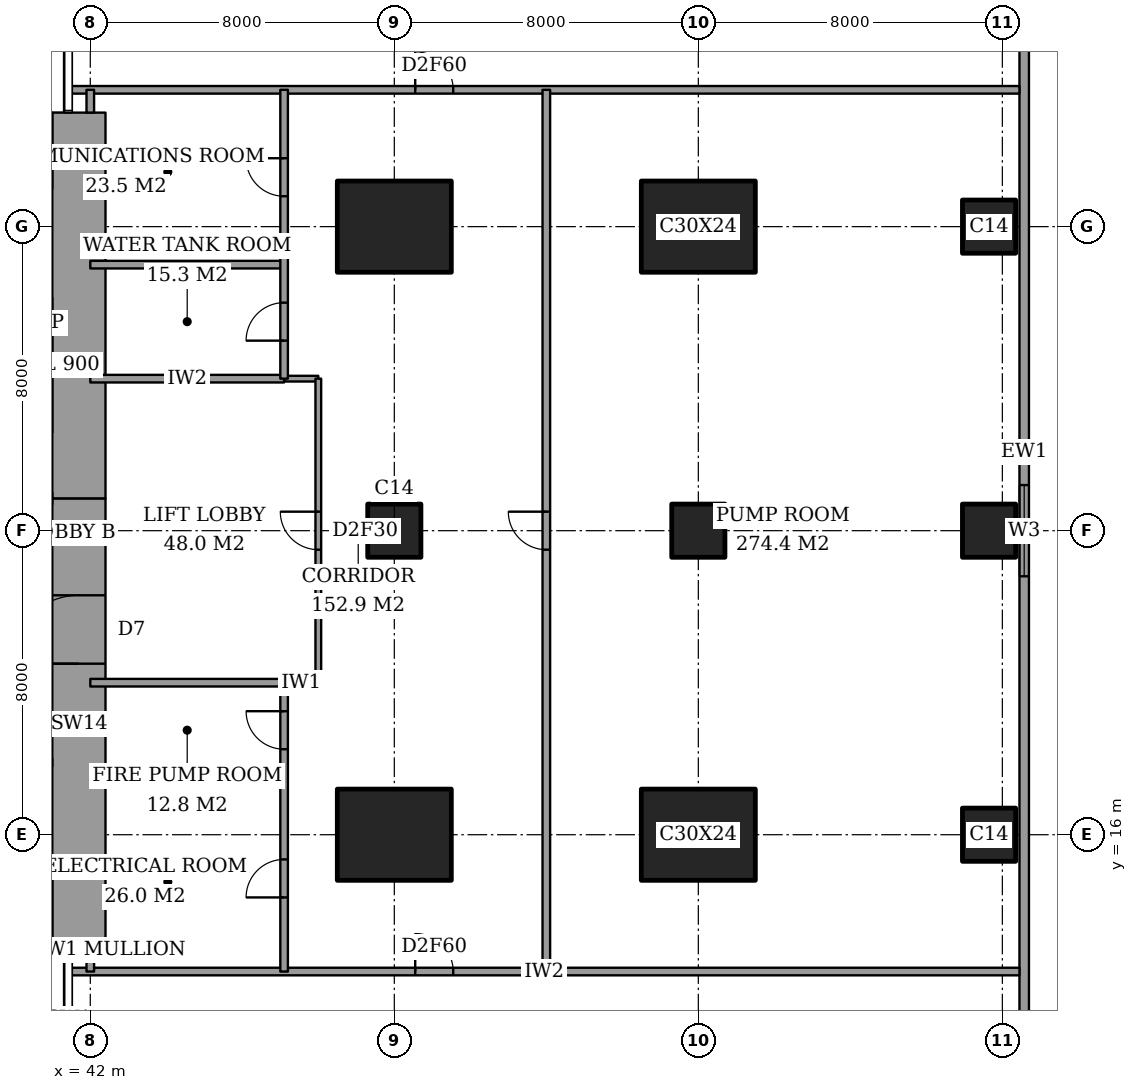
"""IFC4 building model, lengths in metres.
Left out: names, types, materials, properties, quantities, classifications, styles, units other than length and angle.
Written with IfcOpenShell. Run it as: python <this file> out.ifc"""

import sys

from ifc_helpers import new_model, si_unit, direction, frame, frame_2d, origin, origin_2d, place, context, subcontext, project, spatial, rectangle, extrude, element, fill, save


model = new_model("IFC4")
c1 = context("Model", 3, precision=1e-05, world=origin(), true_north=direction((0.0, 1.0)))
c2 = subcontext(c1, "Body", "Model", "MODEL_VIEW")
j1 = project(units=[si_unit("LENGTHUNIT", "METRE"), si_unit("PLANEANGLEUNIT", "RADIAN")], contexts=[c1])
p1 = place(None, origin())
s1 = spatial("IfcSite", under=j1, at=p1, CompositionType="ELEMENT")
p2 = place(p1, origin())
s2 = spatial("IfcBuilding", under=s1, at=p2, CompositionType="ELEMENT")
p3 = place(p2, frame((0.0, 0.0, 291.6)))
s3 = spatial("IfcBuildingStorey", under=s2, at=p3, CompositionType="ELEMENT", Elevation=291.6)
p4 = place(p3, frame((50.0, 16.0, 0.0), z_axis=(0.0, 0.0, 1.0), x_axis=(1.0, 0.0, 0.0)))
e1 = element("IfcColumn", 1, at=p4, inside=s3, PredefinedType="COLUMN", context=c2, shape_type="SweptSolid", body=[
    extrude(rectangle(XDim=3.0, YDim=2.4, at=origin_2d()), origin(), (0.0, 0.0, 1.0), 5.0),
])
p5 = place(p3, frame((50.0, 24.0, 0.0), z_axis=(0.0, 0.0, 1.0), x_axis=(1.0, 0.0, 0.0)))
e2 = element("IfcColumn", 2, at=p5, inside=s3, PredefinedType="COLUMN", context=c2, shape_type="SweptSolid", body=[
    extrude(rectangle(XDim=1.4, YDim=1.4, at=origin_2d()), origin(), (0.0, 0.0, 1.0), 5.0),
])
for number, where, z_axis, x_axis in (
    (3, (50.0, 32.0, 0.0), (0.0, 0.0, 1.0), (1.0, 0.0, 0.0)),
    (4, (58.0, 16.0, 0.0), (0.0, 0.0, 1.0), (1.0, 0.0, 0.0)),
):
    element("IfcColumn", number, at=place(p3, frame(where, z_axis=z_axis, x_axis=x_axis)), inside=s3, PredefinedType="COLUMN", context=c2, shape_type="SweptSolid", body=[
        extrude(rectangle(XDim=3.0, YDim=2.4, at=origin_2d()), origin(), (0.0, 0.0, 1.0), 5.0),
    ])
p6 = place(p3, frame((58.0, 24.0, 0.0), z_axis=(0.0, 0.0, 1.0), x_axis=(1.0, 0.0, 0.0)))
e5 = element("IfcColumn", 5, at=p6, inside=s3, PredefinedType="COLUMN", context=c2, shape_type="SweptSolid", body=[
    extrude(rectangle(XDim=1.4, YDim=1.4, at=origin_2d()), origin(), (0.0, 0.0, 1.0), 5.0),
])
p7 = place(p3, frame((58.0, 32.0, 0.0), z_axis=(0.0, 0.0, 1.0), x_axis=(1.0, 0.0, 0.0)))
e6 = element("IfcColumn", 6, at=p7, inside=s3, PredefinedType="COLUMN", context=c2, shape_type="SweptSolid", body=[
    extrude(rectangle(XDim=3.0, YDim=2.4, at=origin_2d()), origin(), (0.0, 0.0, 1.0), 5.0),
])
for number, where, z_axis, x_axis in (
    (7, (65.65, 16.0, 0.0), (0.0, 0.0, 1.0), (1.0, 0.0, 0.0)),
    (8, (65.65, 24.0, 0.0), (0.0, 0.0, 1.0), (1.0, 0.0, 0.0)),
    (9, (65.65, 32.0, 0.0), (0.0, 0.0, 1.0), (1.0, 0.0, 0.0)),
):
    element("IfcColumn", number, at=place(p3, frame(where, z_axis=z_axis, x_axis=x_axis)), inside=s3, PredefinedType="COLUMN", context=c2, shape_type="SweptSolid", body=[
        extrude(rectangle(XDim=1.4, YDim=1.4, at=origin_2d()), origin(), (0.0, 0.0, 1.0), 5.0),
    ])
p8 = place(p3, frame((41.7, 13.0, 0.0), z_axis=(0.0, 0.0, 1.0), x_axis=(0.0, 1.0, 0.0)))
e10 = element("IfcWall", 10, at=p8, inside=s3, PredefinedType="SHEAR", context=c2, shape_type="SweptSolid", body=[
    extrude(rectangle(XDim=11.85, YDim=1.4, at=frame_2d((5.925, 0.0))), origin(), (0.0, 0.0, 1.0), 5.0),
])
p9 = place(p8, frame((7.5, 0.0, 0.0)))
e11 = element("IfcOpeningElement", 11, at=p9, cuts=e10, PredefinedType="OPENING", context=c2, shape_type="SweptSolid", body=[
    extrude(rectangle(XDim=1.8, YDim=2.4, at=frame_2d((0.9, 1.2))), frame((0.0, 0.71, 0.0), z_axis=(0.0, -1.0, 0.0), x_axis=(1.0, 0.0, 0.0)), (0.0, 0.0, 1.0), 1.42),
])
p10 = place(p3, frame((41.7, 24.85, 0.0), z_axis=(0.0, 0.0, 1.0), x_axis=(0.0, 1.0, 0.0)))
e12 = element("IfcWall", 12, at=p10, inside=s3, PredefinedType="SHEAR", context=c2, shape_type="SweptSolid", body=[
    extrude(rectangle(XDim=10.15, YDim=1.4, at=frame_2d((5.075, 0.0))), origin(), (0.0, 0.0, 1.0), 5.0),
])
p11 = place(p3, frame((66.575, 3.175, 0.0), z_axis=(0.0, 0.0, 1.0), x_axis=(0.0, 1.0, 0.0)))
e13 = element("IfcWall", 13, at=p11, inside=s3, PredefinedType="SOLIDWALL", context=c2, shape_type="SweptSolid", body=[
    extrude(rectangle(XDim=41.65, YDim=0.25, at=frame_2d((20.825, 0.0))), origin(), (0.0, 0.0, 1.0), 5.0),
])
p12 = place(p11, frame((1.35, 0.0, 0.6)))
e14 = element("IfcOpeningElement", 14, at=p12, cuts=e13, PredefinedType="OPENING", context=c2, shape_type="SweptSolid", body=[
    extrude(rectangle(XDim=2.4, YDim=3.0, at=frame_2d((1.2, 1.5))), frame((0.0, 0.135, 0.0), z_axis=(0.0, -1.0, 0.0), x_axis=(1.0, 0.0, 0.0)), (0.0, 0.0, 1.0), 0.27),
])
p13 = place(p11, frame((19.625, 0.0, 0.6)))
e15 = element("IfcOpeningElement", 15, at=p13, cuts=e13, PredefinedType="OPENING", context=c2, shape_type="SweptSolid", body=[
    extrude(rectangle(XDim=2.4, YDim=3.0, at=frame_2d((1.2, 1.5))), frame((0.0, 0.135, 0.0), z_axis=(0.0, -1.0, 0.0), x_axis=(1.0, 0.0, 0.0)), (0.0, 0.0, 1.0), 0.27),
])
p14 = place(p11, frame((37.9, 0.0, 0.6)))
e16 = element("IfcOpeningElement", 16, at=p14, cuts=e13, PredefinedType="OPENING", context=c2, shape_type="SweptSolid", body=[
    extrude(rectangle(XDim=2.4, YDim=3.0, at=frame_2d((1.2, 1.5))), frame((0.0, 0.135, 0.0), z_axis=(0.0, -1.0, 0.0), x_axis=(1.0, 0.0, 0.0)), (0.0, 0.0, 1.0), 0.27),
])
p15 = place(p3, frame((41.439, 12.4, 0.0), z_axis=(0.0, 0.0, 1.0), x_axis=(1.0, 0.0, 0.0)))
e17 = element("IfcWall", 17, at=p15, inside=s3, PredefinedType="PARTITIONING", context=c2, shape_type="SweptSolid", body=[
    extrude(rectangle(XDim=25.011, YDim=0.2, at=frame_2d((12.505, 0.0))), origin(), (0.0, 0.0, 1.0), 4.7),
])
p16 = place(p15, frame((9.111, 0.0, 0.0)))
e18 = element("IfcOpeningElement", 18, at=p16, cuts=e17, PredefinedType="OPENING", context=c2, shape_type="SweptSolid", body=[
    extrude(rectangle(XDim=1.0, YDim=2.1, at=frame_2d((0.5, 1.05))), frame((0.0, 0.11, 0.0), z_axis=(0.0, -1.0, 0.0), x_axis=(1.0, 0.0, 0.0)), (0.0, 0.0, 1.0), 0.22),
])
for number, where, z_axis, x_axis in (
    (19, (42.0, 17.5, 0.0), (0.0, 0.0, 1.0), (1.0, 0.0, 0.0)),
    (20, (42.0, 20.0, 0.0), (0.0, 0.0, 1.0), (1.0, 0.0, 0.0)),
):
    element("IfcWall", number, at=place(p3, frame(where, z_axis=z_axis, x_axis=x_axis)), inside=s3, PredefinedType="PARTITIONING", context=c2, shape_type="SweptSolid", body=[
        extrude(rectangle(XDim=5.1, YDim=0.2, at=frame_2d((2.55, 0.0))), origin(), (0.0, 0.0, 1.0), 4.7),
    ])
p17 = place(p3, frame((47.1, 20.0, 0.0), z_axis=(0.0, 0.0, 1.0), x_axis=(1.0, 0.0, 0.0)))
e21 = element("IfcWall", 21, at=p17, inside=s3, PredefinedType="PARTITIONING", context=c2, shape_type="SweptSolid", body=[
    extrude(rectangle(XDim=0.9, YDim=0.15, at=frame_2d((0.45, 0.0))), origin(), (0.0, 0.0, 1.0), 4.7),
])
p18 = place(p3, frame((42.0, 28.0, 0.0), z_axis=(0.0, 0.0, 1.0), x_axis=(1.0, 0.0, 0.0)))
e22 = element("IfcWall", 22, at=p18, inside=s3, PredefinedType="PARTITIONING", context=c2, shape_type="SweptSolid", body=[
    extrude(rectangle(XDim=5.1, YDim=0.2, at=frame_2d((2.55, 0.0))), origin(), (0.0, 0.0, 1.0), 4.7),
])
p19 = place(p3, frame((47.1, 28.0, 0.0), z_axis=(0.0, 0.0, 1.0), x_axis=(1.0, 0.0, 0.0)))
e23 = element("IfcWall", 23, at=p19, inside=s3, PredefinedType="PARTITIONING", context=c2, shape_type="SweptSolid", body=[
    extrude(rectangle(XDim=0.9, YDim=0.15, at=frame_2d((0.45, 0.0))), origin(), (0.0, 0.0, 1.0), 4.7),
])
p20 = place(p3, frame((42.0, 31.0, 0.0), z_axis=(0.0, 0.0, 1.0), x_axis=(1.0, 0.0, 0.0)))
e24 = element("IfcWall", 24, at=p20, inside=s3, PredefinedType="PARTITIONING", context=c2, shape_type="SweptSolid", body=[
    extrude(rectangle(XDim=5.1, YDim=0.2, at=frame_2d((2.55, 0.0))), origin(), (0.0, 0.0, 1.0), 4.7),
])
p21 = place(p3, frame((41.439, 35.6, 0.0), z_axis=(0.0, 0.0, 1.0), x_axis=(1.0, 0.0, 0.0)))
e25 = element("IfcWall", 25, at=p21, inside=s3, PredefinedType="PARTITIONING", context=c2, shape_type="SweptSolid", body=[
    extrude(rectangle(XDim=25.011, YDim=0.2, at=frame_2d((12.505, 0.0))), origin(), (0.0, 0.0, 1.0), 4.7),
])
p22 = place(p21, frame((9.111, 0.0, 0.0)))
e26 = element("IfcOpeningElement", 26, at=p22, cuts=e25, PredefinedType="OPENING", context=c2, shape_type="SweptSolid", body=[
    extrude(rectangle(XDim=1.0, YDim=2.1, at=frame_2d((0.5, 1.05))), frame((0.0, 0.11, 0.0), z_axis=(0.0, -1.0, 0.0), x_axis=(1.0, 0.0, 0.0)), (0.0, 0.0, 1.0), 0.22),
])
for number, where, z_axis, x_axis in (
    (27, (42.0, 12.4, 0.0), (0.0, 0.0, 1.0), (0.0, 1.0, 0.0)),
    (28, (42.0, 35.0, 0.0), (0.0, 0.0, 1.0), (0.0, 1.0, 0.0)),
):
    element("IfcWall", number, at=place(p3, frame(where, z_axis=z_axis, x_axis=x_axis)), inside=s3, PredefinedType="PARTITIONING", context=c2, shape_type="SweptSolid", body=[
        extrude(rectangle(XDim=0.6, YDim=0.2, at=frame_2d((0.3, 0.0))), origin(), (0.0, 0.0, 1.0), 4.7),
    ])
p23 = place(p3, frame((47.1, 12.4, 0.0), z_axis=(0.0, 0.0, 1.0), x_axis=(0.0, 1.0, 0.0)))
e29 = element("IfcWall", 29, at=p23, inside=s3, PredefinedType="PARTITIONING", context=c2, shape_type="SweptSolid", body=[
    extrude(rectangle(XDim=7.6, YDim=0.2, at=frame_2d((3.8, 0.0))), origin(), (0.0, 0.0, 1.0), 4.7),
])
p24 = place(p23, frame((1.95, 0.0, 0.0)))
e30 = element("IfcOpeningElement", 30, at=p24, cuts=e29, PredefinedType="OPENING", context=c2, shape_type="SweptSolid", body=[
    extrude(rectangle(XDim=1.0, YDim=2.1, at=frame_2d((0.5, 1.05))), frame((0.0, 0.11, 0.0), z_axis=(0.0, -1.0, 0.0), x_axis=(1.0, 0.0, 0.0)), (0.0, 0.0, 1.0), 0.22),
])
p25 = place(p23, frame((5.85, 0.0, 0.0)))
e31 = element("IfcOpeningElement", 31, at=p25, cuts=e29, PredefinedType="OPENING", context=c2, shape_type="SweptSolid", body=[
    extrude(rectangle(XDim=1.0, YDim=2.1, at=frame_2d((0.5, 1.05))), frame((0.0, 0.11, 0.0), z_axis=(0.0, -1.0, 0.0), x_axis=(1.0, 0.0, 0.0)), (0.0, 0.0, 1.0), 0.22),
])
p26 = place(p3, frame((47.1, 28.0, 0.0), z_axis=(0.0, 0.0, 1.0), x_axis=(0.0, 1.0, 0.0)))
e32 = element("IfcWall", 32, at=p26, inside=s3, PredefinedType="PARTITIONING", context=c2, shape_type="SweptSolid", body=[
    extrude(rectangle(XDim=7.6, YDim=0.2, at=frame_2d((3.8, 0.0))), origin(), (0.0, 0.0, 1.0), 4.7),
])
p27 = place(p26, frame((1.0, 0.0, 0.0)))
e33 = element("IfcOpeningElement", 33, at=p27, cuts=e32, PredefinedType="OPENING", context=c2, shape_type="SweptSolid", body=[
    extrude(rectangle(XDim=1.0, YDim=2.1, at=frame_2d((0.5, 1.05))), frame((0.0, 0.11, 0.0), z_axis=(0.0, -1.0, 0.0), x_axis=(1.0, 0.0, 0.0)), (0.0, 0.0, 1.0), 0.22),
])
p28 = place(p26, frame((4.8, 0.0, 0.0)))
e34 = element("IfcOpeningElement", 34, at=p28, cuts=e32, PredefinedType="OPENING", context=c2, shape_type="SweptSolid", body=[
    extrude(rectangle(XDim=1.0, YDim=2.1, at=frame_2d((0.5, 1.05))), frame((0.0, 0.11, 0.0), z_axis=(0.0, -1.0, 0.0), x_axis=(1.0, 0.0, 0.0)), (0.0, 0.0, 1.0), 0.22),
])
p29 = place(p3, frame((48.0, 20.0, 0.0), z_axis=(0.0, 0.0, 1.0), x_axis=(0.0, 1.0, 0.0)))
e35 = element("IfcWall", 35, at=p29, inside=s3, PredefinedType="PARTITIONING", context=c2, shape_type="SweptSolid", body=[
    extrude(rectangle(XDim=8.0, YDim=0.15, at=frame_2d((4.0, 0.0))), origin(), (0.0, 0.0, 1.0), 4.7),
])
p30 = place(p29, frame((3.5, 0.0, 0.0)))
e36 = element("IfcOpeningElement", 36, at=p30, cuts=e35, PredefinedType="OPENING", context=c2, shape_type="SweptSolid", body=[
    extrude(rectangle(XDim=1.0, YDim=2.1, at=frame_2d((0.5, 1.05))), frame((0.0, 0.085, 0.0), z_axis=(0.0, -1.0, 0.0), x_axis=(1.0, 0.0, 0.0)), (0.0, 0.0, 1.0), 0.17),
])
p31 = place(p3, frame((54.0, 12.4, 0.0), z_axis=(0.0, 0.0, 1.0), x_axis=(0.0, 1.0, 0.0)))
e37 = element("IfcWall", 37, at=p31, inside=s3, PredefinedType="PARTITIONING", context=c2, shape_type="SweptSolid", body=[
    extrude(rectangle(XDim=23.2, YDim=0.2, at=frame_2d((11.6, 0.0))), origin(), (0.0, 0.0, 1.0), 4.7),
])
p32 = place(p31, frame((11.1, 0.0, 0.0)))
e38 = element("IfcOpeningElement", 38, at=p32, cuts=e37, PredefinedType="OPENING", context=c2, shape_type="SweptSolid", body=[
    extrude(rectangle(XDim=1.0, YDim=2.1, at=frame_2d((0.5, 1.05))), frame((0.0, 0.11, 0.0), z_axis=(0.0, -1.0, 0.0), x_axis=(1.0, 0.0, 0.0)), (0.0, 0.0, 1.0), 0.22),
])
p33 = place(p3, frame((28.3, 17.9, 0.0), z_axis=(0.0, 0.0, 1.0), x_axis=(1.0, 0.0, 0.0)))
e39 = element("IfcWall", 39, at=p33, inside=s3, PredefinedType="PARTITIONING", context=c2, shape_type="SweptSolid", body=[
    extrude(rectangle(XDim=12.7, YDim=0.2, at=frame_2d((6.35, 0.0))), origin(), (0.0, 0.0, 1.0), 5.0),
])
p34 = place(p33, frame((1.0, 0.0, 0.0)))
e40 = element("IfcOpeningElement", 40, at=p34, cuts=e39, PredefinedType="OPENING", context=c2, shape_type="SweptSolid", body=[
    extrude(rectangle(XDim=1.0, YDim=2.1, at=frame_2d((0.5, 1.05))), frame((0.0, 0.11, 0.0), z_axis=(0.0, -1.0, 0.0), x_axis=(1.0, 0.0, 0.0)), (0.0, 0.0, 1.0), 0.22),
])
p35 = place(p33, frame((10.6, 0.0, 0.0)))
e41 = element("IfcOpeningElement", 41, at=p35, cuts=e39, PredefinedType="OPENING", context=c2, shape_type="SweptSolid", body=[
    extrude(rectangle(XDim=1.2, YDim=2.1, at=frame_2d((0.6, 1.05))), frame((0.0, 0.11, 0.0), z_axis=(0.0, -1.0, 0.0), x_axis=(1.0, 0.0, 0.0)), (0.0, 0.0, 1.0), 0.22),
])
p36 = place(p13, origin())
e42 = element("IfcWindow", 42, at=p36, inside=s3, PartitioningType="SINGLE_PANEL", PredefinedType="WINDOW", context=c2, shape_type="SweptSolid", body=[
    extrude(rectangle(XDim=2.4, YDim=3.0, at=frame_2d((1.2, 1.5))), frame((0.0, 0.03, 0.0), z_axis=(0.0, -1.0, 0.0), x_axis=(1.0, 0.0, 0.0)), (0.0, 0.0, 1.0), 0.06),
])
fill(e15, e42)
p37 = place(p16, origin())
e43 = element("IfcDoor", 43, at=p37, inside=s3, OperationType="SINGLE_SWING_RIGHT", PredefinedType="DOOR", context=c2, shape_type="SweptSolid", body=[
    extrude(rectangle(XDim=1.0, YDim=2.1, at=frame_2d((0.5, 1.05))), frame((0.0, 0.025, 0.0), z_axis=(0.0, -1.0, 0.0), x_axis=(1.0, 0.0, 0.0)), (0.0, 0.0, 1.0), 0.05),
])
fill(e18, e43)
p38 = place(p32, origin())
e44 = element("IfcDoor", 44, at=p38, inside=s3, OperationType="SINGLE_SWING_LEFT", PredefinedType="DOOR", context=c2, shape_type="SweptSolid", body=[
    extrude(rectangle(XDim=1.0, YDim=2.1, at=frame_2d((0.5, 1.05))), frame((0.0, 0.025, 0.0), z_axis=(0.0, -1.0, 0.0), x_axis=(1.0, 0.0, 0.0)), (0.0, 0.0, 1.0), 0.05),
])
fill(e38, e44)
p39 = place(p22, origin())
e45 = element("IfcDoor", 45, at=p39, inside=s3, OperationType="SINGLE_SWING_RIGHT", PredefinedType="DOOR", context=c2, shape_type="SweptSolid", body=[
    extrude(rectangle(XDim=1.0, YDim=2.1, at=frame_2d((0.5, 1.05))), frame((0.0, 0.025, 0.0), z_axis=(0.0, -1.0, 0.0), x_axis=(1.0, 0.0, 0.0)), (0.0, 0.0, 1.0), 0.05),
])
fill(e26, e45)
p40 = place(p30, origin())
e46 = element("IfcDoor", 46, at=p40, inside=s3, OperationType="SINGLE_SWING_LEFT", PredefinedType="DOOR", context=c2, shape_type="SweptSolid", body=[
    extrude(rectangle(XDim=1.0, YDim=2.1, at=frame_2d((0.5, 1.05))), frame((0.0, 0.025, 0.0), z_axis=(0.0, -1.0, 0.0), x_axis=(1.0, 0.0, 0.0)), (0.0, 0.0, 1.0), 0.05),
])
fill(e36, e46)
p41 = place(p24, origin())
e47 = element("IfcDoor", 47, at=p41, inside=s3, OperationType="SINGLE_SWING_RIGHT", PredefinedType="DOOR", context=c2, shape_type="SweptSolid", body=[
    extrude(rectangle(XDim=1.0, YDim=2.1, at=frame_2d((0.5, 1.05))), frame((0.0, 0.025, 0.0), z_axis=(0.0, -1.0, 0.0), x_axis=(1.0, 0.0, 0.0)), (0.0, 0.0, 1.0), 0.05),
])
fill(e30, e47)
p42 = place(p25, origin())
e48 = element("IfcDoor", 48, at=p42, inside=s3, OperationType="SINGLE_SWING_LEFT", PredefinedType="DOOR", context=c2, shape_type="SweptSolid", body=[
    extrude(rectangle(XDim=1.0, YDim=2.1, at=frame_2d((0.5, 1.05))), frame((0.0, 0.025, 0.0), z_axis=(0.0, -1.0, 0.0), x_axis=(1.0, 0.0, 0.0)), (0.0, 0.0, 1.0), 0.05),
])
fill(e31, e48)
p43 = place(p27, origin())
e49 = element("IfcDoor", 49, at=p43, inside=s3, OperationType="SINGLE_SWING_RIGHT", PredefinedType="DOOR", context=c2, shape_type="SweptSolid", body=[
    extrude(rectangle(XDim=1.0, YDim=2.1, at=frame_2d((0.5, 1.05))), frame((0.0, 0.025, 0.0), z_axis=(0.0, -1.0, 0.0), x_axis=(1.0, 0.0, 0.0)), (0.0, 0.0, 1.0), 0.05),
])
fill(e33, e49)
p44 = place(p28, origin())
e50 = element("IfcDoor", 50, at=p44, inside=s3, OperationType="SINGLE_SWING_LEFT", PredefinedType="DOOR", context=c2, shape_type="SweptSolid", body=[
    extrude(rectangle(XDim=1.0, YDim=2.1, at=frame_2d((0.5, 1.05))), frame((0.0, 0.025, 0.0), z_axis=(0.0, -1.0, 0.0), x_axis=(1.0, 0.0, 0.0)), (0.0, 0.0, 1.0), 0.05),
])
fill(e34, e50)
p45 = place(p9, origin())
e51 = element("IfcDoor", 51, at=p45, inside=s3, OperationType="DOUBLE_DOOR_DOUBLE_SWING", PredefinedType="DOOR", context=c2, shape_type="SweptSolid", body=[
    extrude(rectangle(XDim=1.8, YDim=2.4, at=frame_2d((0.9, 1.2))), frame((0.0, 0.025, 0.0), z_axis=(0.0, -1.0, 0.0), x_axis=(1.0, 0.0, 0.0)), (0.0, 0.0, 1.0), 0.05),
])
fill(e11, e51)
save(model, sys.argv[1])
